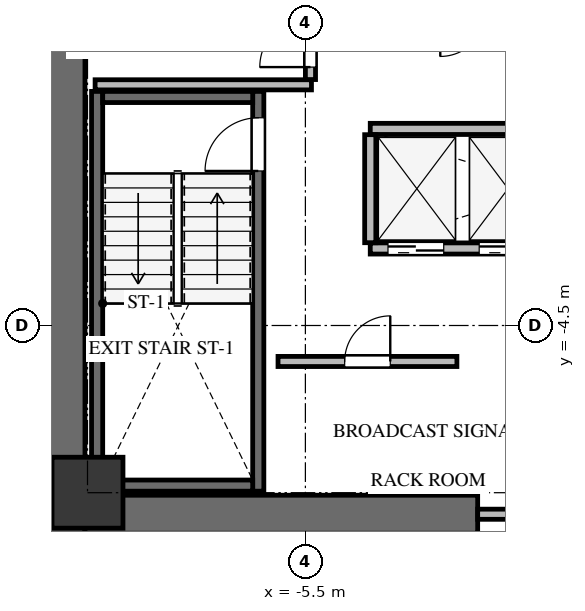
"""IFC4 building model, lengths in metres.
Left out: names, types, materials, properties, quantities, classifications, styles, units other than length and angle.
Written with IfcOpenShell. Run it as: python <this file> out.ifc"""

import sys

from ifc_helpers import new_model, si_unit, direction, frame, frame_2d, origin, origin_2d, place, context, subcontext, project, spatial, rectangle, extrude, source, transform, mapped, element, fill, save


model = new_model("IFC4")
c1 = context("Model", 3, precision=1e-05, world=origin(), true_north=direction((0.0, 1.0)))
c2 = subcontext(c1, "Body", "Model", "MODEL_VIEW")
j1 = project(units=[si_unit("LENGTHUNIT", "METRE"), si_unit("PLANEANGLEUNIT", "RADIAN")], contexts=[c1])
p1 = place(None, origin())
s1 = spatial("IfcSite", under=j1, at=p1, CompositionType="ELEMENT")
p2 = place(p1, origin())
s2 = spatial("IfcBuilding", under=s1, at=p2, CompositionType="ELEMENT")
p3 = place(p2, frame((0.0, 0.0, 127.2)))
s3 = spatial("IfcBuildingStorey", under=s2, at=p3, CompositionType="ELEMENT", Elevation=127.2)
p4 = place(p3, frame((-10.225, -8.6, 0.0), z_axis=(0.0, 0.0, 1.0), x_axis=(0.0, 1.0, 0.0)))
e1 = element("IfcWall", 1, at=p4, inside=s3, PredefinedType="SHEAR", context=c2, shape_type="SweptSolid", body=[
    extrude(rectangle(XDim=17.2, YDim=0.75, at=frame_2d((8.6, 0.0))), origin(), (0.0, 0.0, 1.0), 3.3),
])
p5 = place(p3, frame((-9.85, -8.225, 0.0), z_axis=(0.0, 0.0, 1.0), x_axis=(1.0, 0.0, 0.0)))
e2 = element("IfcWall", 2, at=p5, inside=s3, PredefinedType="SHEAR", context=c2, shape_type="SweptSolid", body=[
    extrude(rectangle(XDim=7.75, YDim=0.75, at=frame_2d((3.875, 0.0))), origin(), (0.0, 0.0, 1.0), 3.3),
])
p6 = place(p3, frame((-6.43, -7.77, -0.24), z_axis=(0.0, 0.0, 1.0), x_axis=(0.0, 1.0, 0.0)))
e3 = element("IfcWall", 3, at=p6, inside=s3, PredefinedType="SHEAR", context=c2, shape_type="SweptSolid", body=[
    extrude(rectangle(XDim=7.89, YDim=0.22, at=frame_2d((3.945, 0.0))), origin(), (0.0, 0.0, 1.0), 3.3),
])
p7 = place(p6, frame((6.32, 0.0, 0.0)))
e4 = element("IfcOpeningElement", 4, at=p7, cuts=e3, PredefinedType="OPENING", context=c2, shape_type="SweptSolid", body=[
    extrude(rectangle(XDim=1.05, YDim=2.15, at=frame_2d((0.525, 1.075))), frame((0.0, 0.12, 0.0), z_axis=(0.0, -1.0, 0.0), x_axis=(1.0, 0.0, 0.0)), (0.0, 0.0, 1.0), 0.24),
])
p8 = place(p3, frame((-9.61, 0.12, -0.24), z_axis=(0.0, 0.0, 1.0), x_axis=(0.0, -1.0, 0.0)))
e5 = element("IfcWall", 5, at=p8, inside=s3, PredefinedType="SHEAR", context=c2, shape_type="SweptSolid", body=[
    extrude(rectangle(XDim=7.89, YDim=0.22, at=frame_2d((3.945, 0.0))), origin(), (0.0, 0.0, 1.0), 3.3),
])
for number, where, z_axis, x_axis in (
    (6, (-9.5, -7.66, -0.24), (0.0, 0.0, 1.0), (1.0, 0.0, 0.0)),
    (7, (-6.54, 0.01, -0.24), (0.0, 0.0, 1.0), (-1.0, 0.0, 0.0)),
):
    element("IfcWall", number, at=place(p3, frame(where, z_axis=z_axis, x_axis=x_axis)), inside=s3, PredefinedType="SHEAR", context=c2, shape_type="SweptSolid", body=[
        extrude(rectangle(XDim=2.96, YDim=0.22, at=frame_2d((1.48, 0.0))), origin(), (0.0, 0.0, 1.0), 3.3),
    ])
m1 = source(origin(), c2, "Body", "SweptSolid", [
    extrude(rectangle(XDim=1.4, YDim=1.4, at=origin_2d()), origin(), (0.0, 0.0, 1.0), 3.3),
])
p9 = place(p3, frame((-9.8, -7.8, -0.24), z_axis=(0.0, 0.0, 1.0), x_axis=(1.0, 0.0, 0.0)))
e8 = element("IfcColumn", 8, at=p9, inside=s3, PredefinedType="COLUMN", context=c2, shape_type="MappedRepresentation", body=[
    mapped(m1, transform((0.0, 0.0, 0.0), x_axis=(1.0, 0.0, 0.0), y_axis=(0.0, 1.0, 0.0), z_axis=(0.0, 0.0, 1.0), scale=1.0)),
])
p10 = place(p3, frame((-2.1, -8.225, 0.0), z_axis=(0.0, 0.0, 1.0), x_axis=(1.0, 0.0, 0.0)))
e9 = element("IfcWall", 9, at=p10, inside=s3, PredefinedType="SOLIDWALL", context=c2, shape_type="SweptSolid", body=[
    extrude(rectangle(XDim=4.2, YDim=0.2, at=frame_2d((2.1, 0.0))), origin(), (0.0, 0.0, 1.0), 3.045),
])
p11 = place(p10, frame((1.2, 0.0, 0.0)))
e10 = element("IfcOpeningElement", 10, at=p11, cuts=e9, PredefinedType="OPENING", context=c2, shape_type="SweptSolid", body=[
    extrude(rectangle(XDim=1.8, YDim=2.15, at=frame_2d((0.9, 1.075))), frame((0.0, 0.11, 0.0), z_axis=(0.0, -1.0, 0.0), x_axis=(1.0, 0.0, 0.0)), (0.0, 0.0, 1.0), 0.22),
])
p12 = place(p3, frame((-9.65, 0.25, 0.0), z_axis=(0.0, 0.0, 1.0), x_axis=(1.0, 0.0, 0.0)))
e11 = element("IfcWall", 11, at=p12, inside=s3, PredefinedType="SOLIDWALL", context=c2, shape_type="SweptSolid", body=[
    extrude(rectangle(XDim=4.27, YDim=0.2, at=frame_2d((2.135, 0.0))), origin(), (0.0, 0.0, 1.0), 3.045),
])
p13 = place(p3, frame((-5.4, 0.354, 0.0), z_axis=(0.0, 0.0, 1.0), x_axis=(0.0, 1.0, 0.0)))
e12 = element("IfcWall", 12, at=p13, inside=s3, PredefinedType="SOLIDWALL", context=c2, shape_type="SweptSolid", body=[
    extrude(rectangle(XDim=4.026, YDim=0.2, at=frame_2d((2.013, 0.0))), origin(), (0.0, 0.0, 1.0), 3.045),
])
p14 = place(p13, frame((0.246, 0.0, 0.0)))
e13 = element("IfcOpeningElement", 13, at=p14, cuts=e12, PredefinedType="OPENING", context=c2, shape_type="SweptSolid", body=[
    extrude(rectangle(XDim=1.0, YDim=2.15, at=frame_2d((0.5, 1.075))), frame((0.0, 0.11, 0.0), z_axis=(0.0, -1.0, 0.0), x_axis=(1.0, 0.0, 0.0)), (0.0, 0.0, 1.0), 0.22),
])
p15 = place(p3, frame((-4.22, -2.98, 0.0), z_axis=(0.0, 0.0, 1.0), x_axis=(1.0, 0.0, 0.0)))
e14 = element("IfcWall", 14, at=p15, inside=s3, PredefinedType="SOLIDWALL", context=c2, shape_type="SweptSolid", body=[
    extrude(rectangle(XDim=7.24, YDim=0.22, at=frame_2d((3.62, 0.0))), origin(), (0.0, 0.0, 1.0), 3.045),
])
p16 = place(p15, frame((0.35, 0.0, 0.0)))
e15 = element("IfcOpeningElement", 15, at=p16, cuts=e14, PredefinedType="OPENING", context=c2, shape_type="SweptSolid", body=[
    extrude(rectangle(XDim=1.1, YDim=2.15, at=frame_2d((0.55, 1.075))), frame((0.0, 0.12, 0.0), z_axis=(0.0, -1.0, 0.0), x_axis=(1.0, 0.0, 0.0)), (0.0, 0.0, 1.0), 0.24),
])
p17 = place(p15, frame((2.15, 0.0, 0.0)))
e16 = element("IfcOpeningElement", 16, at=p17, cuts=e14, PredefinedType="OPENING", context=c2, shape_type="SweptSolid", body=[
    extrude(rectangle(XDim=1.1, YDim=2.15, at=frame_2d((0.55, 1.075))), frame((0.0, 0.12, 0.0), z_axis=(0.0, -1.0, 0.0), x_axis=(1.0, 0.0, 0.0)), (0.0, 0.0, 1.0), 0.24),
])
p18 = place(p15, frame((3.95, 0.0, 0.0)))
e17 = element("IfcOpeningElement", 17, at=p18, cuts=e14, PredefinedType="OPENING", context=c2, shape_type="SweptSolid", body=[
    extrude(rectangle(XDim=1.1, YDim=2.15, at=frame_2d((0.55, 1.075))), frame((0.0, 0.12, 0.0), z_axis=(0.0, -1.0, 0.0), x_axis=(1.0, 0.0, 0.0)), (0.0, 0.0, 1.0), 0.24),
])
p19 = place(p15, frame((5.75, 0.0, 0.0)))
e18 = element("IfcOpeningElement", 18, at=p19, cuts=e14, PredefinedType="OPENING", context=c2, shape_type="SweptSolid", body=[
    extrude(rectangle(XDim=1.1, YDim=2.15, at=frame_2d((0.55, 1.075))), frame((0.0, 0.12, 0.0), z_axis=(0.0, -1.0, 0.0), x_axis=(1.0, 0.0, 0.0)), (0.0, 0.0, 1.0), 0.24),
])
p20 = place(p3, frame((-4.22, -0.62, 0.0), z_axis=(0.0, 0.0, 1.0), x_axis=(1.0, 0.0, 0.0)))
e19 = element("IfcWall", 19, at=p20, inside=s3, PredefinedType="SOLIDWALL", context=c2, shape_type="SweptSolid", body=[
    extrude(rectangle(XDim=7.24, YDim=0.22, at=frame_2d((3.62, 0.0))), origin(), (0.0, 0.0, 1.0), 3.045),
])
p21 = place(p3, frame((-4.22, -2.866, 0.0), z_axis=(0.0, 0.0, 1.0), x_axis=(0.0, 1.0, 0.0)))
e20 = element("IfcWall", 20, at=p21, inside=s3, PredefinedType="SOLIDWALL", context=c2, shape_type="SweptSolid", body=[
    extrude(rectangle(XDim=2.132, YDim=0.22, at=frame_2d((1.066, 0.0))), origin(), (0.0, 0.0, 1.0), 3.045),
])
p22 = place(p3, frame((-6.04, -5.21, 0.0), z_axis=(0.0, 0.0, 1.0), x_axis=(1.0, 0.0, 0.0)))
e21 = element("IfcWall", 21, at=p22, inside=s3, PredefinedType="SOLIDWALL", context=c2, shape_type="SweptSolid", body=[
    extrude(rectangle(XDim=3.53, YDim=0.2, at=frame_2d((1.765, 0.0))), origin(), (0.0, 0.0, 1.0), 3.045),
])
p23 = place(p22, frame((1.315, 0.0, 0.0)))
e22 = element("IfcOpeningElement", 22, at=p23, cuts=e21, PredefinedType="OPENING", context=c2, shape_type="SweptSolid", body=[
    extrude(rectangle(XDim=0.9, YDim=2.05, at=frame_2d((0.45, 1.025))), frame((0.0, 0.11, 0.0), z_axis=(0.0, -1.0, 0.0), x_axis=(1.0, 0.0, 0.0)), (0.0, 0.0, 1.0), 0.22),
])
m2 = source(origin(), c2, "Body", "SweptSolid", [
    extrude(rectangle(XDim=1.05, YDim=2.15, at=frame_2d((0.525, 1.075))), frame((0.0, 0.025, 0.0), z_axis=(0.0, -1.0, 0.0), x_axis=(1.0, 0.0, 0.0)), (0.0, 0.0, 1.0), 0.05),
])
p24 = place(p7, origin())
e23 = element("IfcDoor", 23, at=p24, inside=s3, OperationType="SINGLE_SWING_LEFT", PredefinedType="DOOR", context=c2, shape_type="MappedRepresentation", body=[
    mapped(m2, transform((0.0, 0.0, 0.0), x_axis=(1.0, 0.0, 0.0), y_axis=(0.0, 1.0, 0.0), z_axis=(0.0, 0.0, 1.0), scale=1.0)),
])
fill(e4, e23)
m3 = source(origin(), c2, "Body", "SweptSolid", [
    extrude(rectangle(XDim=1.0, YDim=2.15, at=frame_2d((0.5, 1.075))), frame((0.0, 0.025, 0.0), z_axis=(0.0, -1.0, 0.0), x_axis=(1.0, 0.0, 0.0)), (0.0, 0.0, 1.0), 0.05),
])
p25 = place(p14, origin())
e24 = element("IfcDoor", 24, at=p25, inside=s3, OperationType="SINGLE_SWING_LEFT", PredefinedType="DOOR", context=c2, shape_type="MappedRepresentation", body=[
    mapped(m3, transform((0.0, 0.0, 0.0), x_axis=(1.0, 0.0, 0.0), y_axis=(0.0, 1.0, 0.0), z_axis=(0.0, 0.0, 1.0), scale=1.0)),
])
fill(e13, e24)
m4 = source(origin(), c2, "Body", "SweptSolid", [
    extrude(rectangle(XDim=1.1, YDim=2.15, at=frame_2d((0.55, 1.075))), frame((0.0, 0.025, 0.0), z_axis=(0.0, -1.0, 0.0), x_axis=(1.0, 0.0, 0.0)), (0.0, 0.0, 1.0), 0.05),
])
p26 = place(p16, origin())
e25 = element("IfcDoor", 25, at=p26, inside=s3, OperationType="DOUBLE_DOOR_SLIDING", PredefinedType="DOOR", context=c2, shape_type="MappedRepresentation", body=[
    mapped(m4, transform((0.0, 0.0, 0.0), x_axis=(1.0, 0.0, 0.0), y_axis=(0.0, 1.0, 0.0), z_axis=(0.0, 0.0, 1.0), scale=1.0)),
])
fill(e15, e25)
p27 = place(p17, origin())
e26 = element("IfcDoor", 26, at=p27, inside=s3, OperationType="DOUBLE_DOOR_SLIDING", PredefinedType="DOOR", context=c2, shape_type="MappedRepresentation", body=[
    mapped(m4, transform((0.0, 0.0, 0.0), x_axis=(1.0, 0.0, 0.0), y_axis=(0.0, 1.0, 0.0), z_axis=(0.0, 0.0, 1.0), scale=1.0)),
])
fill(e16, e26)
m5 = source(origin(), c2, "Body", "SweptSolid", [
    extrude(rectangle(XDim=0.9, YDim=2.05, at=frame_2d((0.45, 1.025))), frame((0.0, 0.025, 0.0), z_axis=(0.0, -1.0, 0.0), x_axis=(1.0, 0.0, 0.0)), (0.0, 0.0, 1.0), 0.05),
])
p28 = place(p23, origin())
e27 = element("IfcDoor", 27, at=p28, inside=s3, OperationType="SINGLE_SWING_RIGHT", PredefinedType="DOOR", context=c2, shape_type="MappedRepresentation", body=[
    mapped(m5, transform((0.0, 0.0, 0.0), x_axis=(1.0, 0.0, 0.0), y_axis=(0.0, 1.0, 0.0), z_axis=(0.0, 0.0, 1.0), scale=1.0)),
])
fill(e22, e27)
save(model, sys.argv[1])
